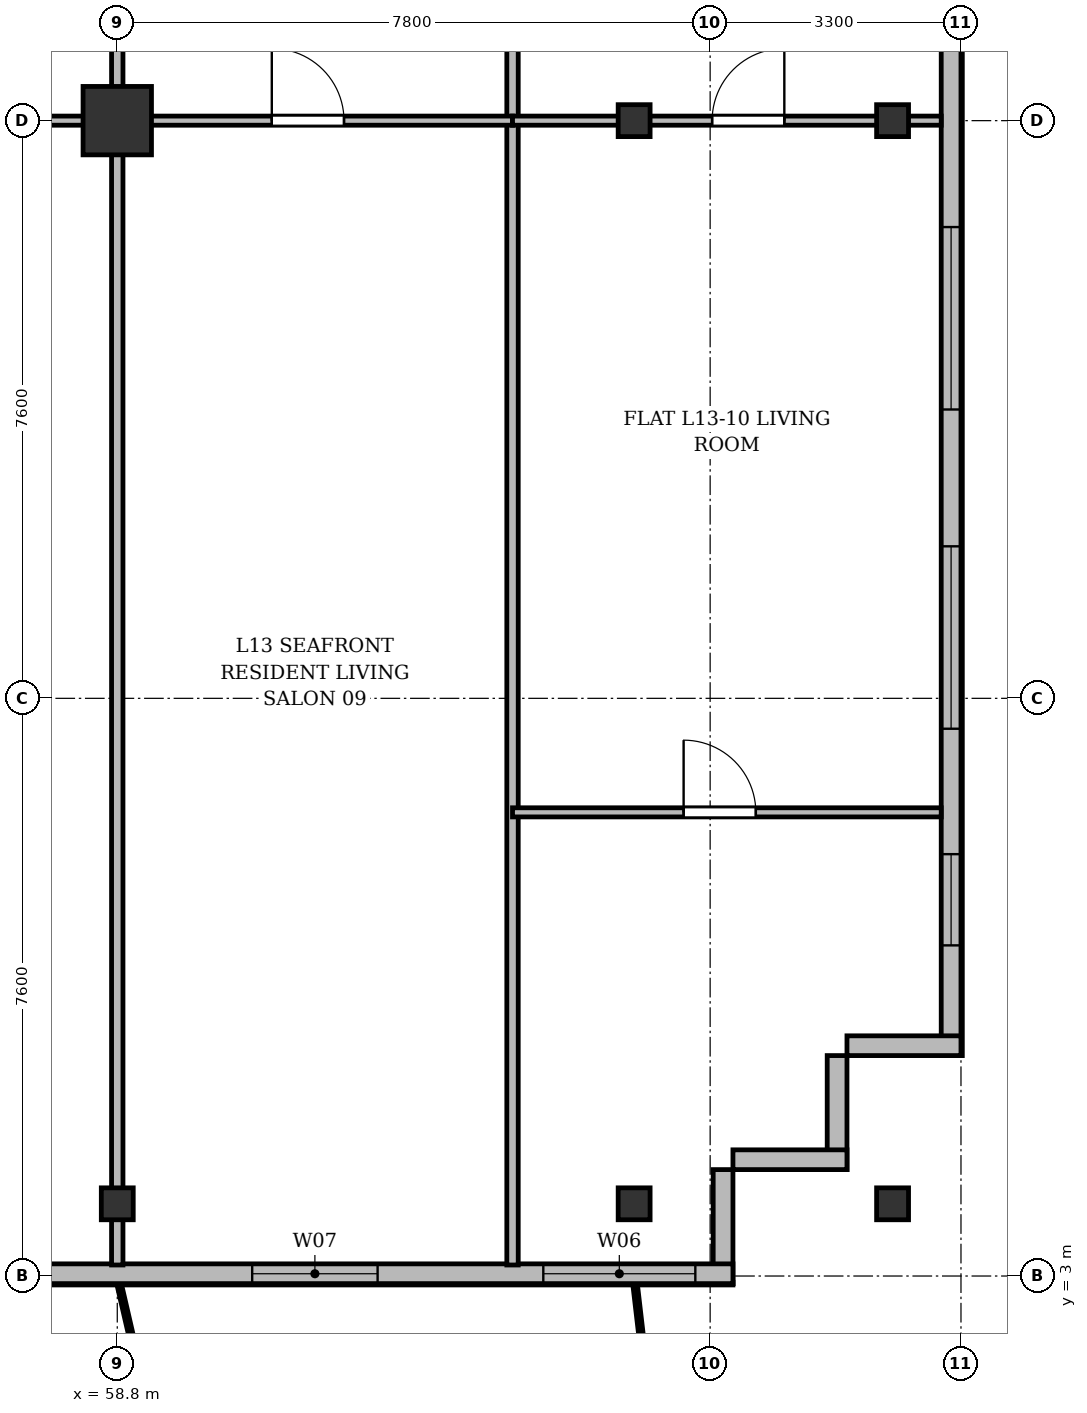
"""IFC4 building model, lengths in metres.
Left out: names, types, materials, properties, quantities, classifications, styles, units other than length and angle.
Written with IfcOpenShell. Run it as: python <this file> out.ifc"""

import sys

from ifc_helpers import new_model, si_unit, direction, frame, frame_2d, origin, origin_2d, place, context, subcontext, project, spatial, rectangle, i_section, extrude, source, transform, mapped, element, fill, save


model = new_model("IFC4")
c1 = context("Model", 3, precision=1e-05, world=origin(), true_north=direction((0.0, 1.0)))
c2 = subcontext(c1, "Body", "Model", "MODEL_VIEW")
j1 = project(units=[si_unit("LENGTHUNIT", "METRE"), si_unit("PLANEANGLEUNIT", "RADIAN")], contexts=[c1])
p1 = place(None, origin())
s1 = spatial("IfcSite", under=j1, at=p1, CompositionType="ELEMENT")
p2 = place(p1, origin())
s2 = spatial("IfcBuilding", under=s1, at=p2, CompositionType="ELEMENT")
p3 = place(p2, frame((0.0, 0.0, 52.3)))
s3 = spatial("IfcBuildingStorey", under=s2, at=p3, CompositionType="ELEMENT", Elevation=52.3)
m1 = source(origin(), c2, "Body", "SweptSolid", [
    extrude(i_section(OverallWidth=0.42, OverallDepth=0.42, WebThickness=0.026, FlangeThickness=0.04, at=origin_2d()), origin(), (0.0, 0.0, 1.0), 3.6),
])
p4 = place(p3, frame((58.8, 3.95, 0.0), z_axis=(0.0, 0.0, 1.0), x_axis=(1.0, 0.0, 0.0)))
e1 = element("IfcColumn", 1, at=p4, inside=s3, PredefinedType="COLUMN", context=c2, shape_type="MappedRepresentation", body=[
    mapped(m1, transform((0.0, 0.0, 0.0), x_axis=(1.0, 0.0, 0.0), y_axis=(0.0, 1.0, 0.0), z_axis=(0.0, 0.0, 1.0), scale=1.0)),
])
m2 = source(origin(), c2, "Body", "SweptSolid", [
    extrude(rectangle(XDim=0.9, YDim=0.9, at=origin_2d()), origin(), (0.0, 0.0, 1.0), 3.6),
])
p5 = place(p3, frame((58.8, 18.2, 0.0), z_axis=(0.0, 0.0, 1.0), x_axis=(1.0, 0.0, 0.0)))
e2 = element("IfcColumn", 2, at=p5, inside=s3, PredefinedType="COLUMN", context=c2, shape_type="MappedRepresentation", body=[
    mapped(m2, transform((0.0, 0.0, 0.0), x_axis=(1.0, 0.0, 0.0), y_axis=(0.0, 1.0, 0.0), z_axis=(0.0, 0.0, 1.0), scale=1.0)),
])
for number, where, z_axis, x_axis in (
    (3, (65.6, 3.95, 0.0), (0.0, 0.0, 1.0), (1.0, 0.0, 0.0)),
    (4, (65.6, 18.2, 0.0), (0.0, 0.0, 1.0), (1.0, 0.0, 0.0)),
    (5, (69.0, 3.95, 0.0), (0.0, 0.0, 1.0), (1.0, 0.0, 0.0)),
    (6, (69.0, 18.2, 0.0), (0.0, 0.0, 1.0), (1.0, 0.0, 0.0)),
):
    element("IfcColumn", number, at=place(p3, frame(where, z_axis=z_axis, x_axis=x_axis)), inside=s3, PredefinedType="COLUMN", context=c2, shape_type="MappedRepresentation", body=[
        mapped(m1, transform((0.0, 0.0, 0.0), x_axis=(1.0, 0.0, 0.0), y_axis=(0.0, 1.0, 0.0), z_axis=(0.0, 0.0, 1.0), scale=1.0)),
    ])
p6 = place(p3, frame((69.77, 45.5, 0.0), z_axis=(0.0, 0.0, 1.0), x_axis=(0.0, -1.0, 0.0)))
e7 = element("IfcWall", 7, at=p6, inside=s3, PredefinedType="SOLIDWALL", context=c2, shape_type="SweptSolid", body=[
    extrude(rectangle(XDim=39.6, YDim=0.26, at=frame_2d((19.8, 0.0))), origin(), (0.0, 0.0, 1.0), 3.34),
])
p7 = place(p6, frame((36.95, 0.0, 0.92)))
e8 = element("IfcOpeningElement", 8, at=p7, cuts=e7, PredefinedType="OPENING", context=c2, shape_type="SweptSolid", body=[
    extrude(rectangle(XDim=1.2, YDim=1.65, at=frame_2d((0.6, 0.825))), frame((0.0, 0.14, 0.0), z_axis=(0.0, -1.0, 0.0), x_axis=(1.0, 0.0, 0.0)), (0.0, 0.0, 1.0), 0.28),
])
p8 = place(p6, frame((32.9, 0.0, 0.92)))
e9 = element("IfcOpeningElement", 9, at=p8, cuts=e7, PredefinedType="OPENING", context=c2, shape_type="SweptSolid", body=[
    extrude(rectangle(XDim=2.4, YDim=2.1, at=frame_2d((1.2, 1.05))), frame((0.0, 0.14, 0.0), z_axis=(0.0, -1.0, 0.0), x_axis=(1.0, 0.0, 0.0)), (0.0, 0.0, 1.0), 0.28),
])
p9 = place(p6, frame((28.7, 0.0, 0.92)))
e10 = element("IfcOpeningElement", 10, at=p9, cuts=e7, PredefinedType="OPENING", context=c2, shape_type="SweptSolid", body=[
    extrude(rectangle(XDim=2.4, YDim=2.1, at=frame_2d((1.2, 1.05))), frame((0.0, 0.14, 0.0), z_axis=(0.0, -1.0, 0.0), x_axis=(1.0, 0.0, 0.0)), (0.0, 0.0, 1.0), 0.28),
])
p10 = place(p6, frame((21.5, 0.0, 0.92)))
e11 = element("IfcOpeningElement", 11, at=p10, cuts=e7, PredefinedType="OPENING", context=c2, shape_type="SweptSolid", body=[
    extrude(rectangle(XDim=2.4, YDim=2.1, at=frame_2d((1.2, 1.05))), frame((0.0, 0.14, 0.0), z_axis=(0.0, -1.0, 0.0), x_axis=(1.0, 0.0, 0.0)), (0.0, 0.0, 1.0), 0.28),
])
p11 = place(p6, frame((7.5, 0.0, 0.92)))
e12 = element("IfcOpeningElement", 12, at=p11, cuts=e7, PredefinedType="OPENING", context=c2, shape_type="SweptSolid", body=[
    extrude(rectangle(XDim=2.4, YDim=2.1, at=frame_2d((1.2, 1.05))), frame((0.0, 0.14, 0.0), z_axis=(0.0, -1.0, 0.0), x_axis=(1.0, 0.0, 0.0)), (0.0, 0.0, 1.0), 0.28),
])
p12 = place(p6, frame((4.5, 0.0, 0.92)))
e13 = element("IfcOpeningElement", 13, at=p12, cuts=e7, PredefinedType="OPENING", context=c2, shape_type="SweptSolid", body=[
    extrude(rectangle(XDim=1.2, YDim=1.65, at=frame_2d((0.6, 0.825))), frame((0.0, 0.14, 0.0), z_axis=(0.0, -1.0, 0.0), x_axis=(1.0, 0.0, 0.0)), (0.0, 0.0, 1.0), 0.28),
])
p13 = place(p6, frame((1.15, 0.0, 0.92)))
e14 = element("IfcOpeningElement", 14, at=p13, cuts=e7, PredefinedType="OPENING", context=c2, shape_type="SweptSolid", body=[
    extrude(rectangle(XDim=1.2, YDim=1.65, at=frame_2d((0.6, 0.825))), frame((0.0, 0.14, 0.0), z_axis=(0.0, -1.0, 0.0), x_axis=(1.0, 0.0, 0.0)), (0.0, 0.0, 1.0), 0.28),
])
p14 = place(p3, frame((69.9, 6.03, 0.0), z_axis=(0.0, 0.0, 1.0), x_axis=(-1.0, 0.0, 0.0)))
e15 = element("IfcWall", 15, at=p14, inside=s3, PredefinedType="SOLIDWALL", context=c2, shape_type="SweptSolid", body=[
    extrude(rectangle(XDim=1.5, YDim=0.26, at=frame_2d((0.75, 0.0))), origin(), (0.0, 0.0, 1.0), 2.752),
])
for number, where, z_axis, x_axis in (
    (16, (68.27, 5.9, 0.0), (0.0, 0.0, 1.0), (0.0, -1.0, 0.0)),
    (17, (68.4, 4.53, 0.0), (0.0, 0.0, 1.0), (-1.0, 0.0, 0.0)),
):
    element("IfcWall", number, at=place(p3, frame(where, z_axis=z_axis, x_axis=x_axis)), inside=s3, PredefinedType="SOLIDWALL", context=c2, shape_type="SweptSolid", body=[
        extrude(rectangle(XDim=1.5, YDim=0.26, at=frame_2d((0.75, 0.0))), origin(), (0.0, 0.0, 1.0), 3.34),
    ])
p15 = place(p3, frame((66.77, 4.4, 0.0), z_axis=(0.0, 0.0, 1.0), x_axis=(0.0, -1.0, 0.0)))
e18 = element("IfcWall", 18, at=p15, inside=s3, PredefinedType="SOLIDWALL", context=c2, shape_type="SweptSolid", body=[
    extrude(rectangle(XDim=1.5, YDim=0.26, at=frame_2d((0.75, 0.0))), origin(), (0.0, 0.0, 1.0), 2.69),
])
p16 = place(p3, frame((66.9, 3.03, 0.0), z_axis=(0.0, 0.0, 1.0), x_axis=(-1.0, 0.0, 0.0)))
e19 = element("IfcWall", 19, at=p16, inside=s3, PredefinedType="SOLIDWALL", context=c2, shape_type="SweptSolid", body=[
    extrude(rectangle(XDim=59.4, YDim=0.26, at=frame_2d((29.7, 0.0))), origin(), (0.0, 0.0, 1.0), 3.34),
])
p17 = place(p16, frame((0.495, 0.0, 0.9)))
e20 = element("IfcOpeningElement", 20, at=p17, cuts=e19, PredefinedType="OPENING", context=c2, shape_type="SweptSolid", body=[
    extrude(rectangle(XDim=2.0, YDim=1.95, at=frame_2d((1.0, 0.975))), frame((0.0, 0.14, 0.0), z_axis=(0.0, -1.0, 0.0), x_axis=(1.0, 0.0, 0.0)), (0.0, 0.0, 1.0), 0.28),
])
p18 = place(p16, frame((4.675, 0.0, 0.9)))
e21 = element("IfcOpeningElement", 21, at=p18, cuts=e19, PredefinedType="OPENING", context=c2, shape_type="SweptSolid", body=[
    extrude(rectangle(XDim=1.65, YDim=1.85, at=frame_2d((0.825, 0.925))), frame((0.0, 0.14, 0.0), z_axis=(0.0, -1.0, 0.0), x_axis=(1.0, 0.0, 0.0)), (0.0, 0.0, 1.0), 0.28),
])
p19 = place(p16, frame((11.1, 0.0, 0.9)))
e22 = element("IfcOpeningElement", 22, at=p19, cuts=e19, PredefinedType="OPENING", context=c2, shape_type="SweptSolid", body=[
    extrude(rectangle(XDim=1.8, YDim=1.8, at=frame_2d((0.9, 0.9))), frame((0.0, 0.14, 0.0), z_axis=(0.0, -1.0, 0.0), x_axis=(1.0, 0.0, 0.0)), (0.0, 0.0, 1.0), 0.28),
])
p20 = place(p16, frame((17.007, 0.0, 0.0)))
e23 = element("IfcOpeningElement", 23, at=p20, cuts=e19, PredefinedType="OPENING", context=c2, shape_type="SweptSolid", body=[
    extrude(rectangle(XDim=1.2, YDim=2.2, at=frame_2d((0.6, 1.1))), frame((0.0, 0.14, 0.0), z_axis=(0.0, -1.0, 0.0), x_axis=(1.0, 0.0, 0.0)), (0.0, 0.0, 1.0), 0.28),
])
p21 = place(p16, frame((20.55, 0.0, 0.9)))
e24 = element("IfcOpeningElement", 24, at=p21, cuts=e19, PredefinedType="OPENING", context=c2, shape_type="SweptSolid", body=[
    extrude(rectangle(XDim=1.5, YDim=1.75, at=frame_2d((0.75, 0.875))), frame((0.0, 0.14, 0.0), z_axis=(0.0, -1.0, 0.0), x_axis=(1.0, 0.0, 0.0)), (0.0, 0.0, 1.0), 0.28),
])
p22 = place(p16, frame((24.5, 0.0, 0.9)))
e25 = element("IfcOpeningElement", 25, at=p22, cuts=e19, PredefinedType="OPENING", context=c2, shape_type="SweptSolid", body=[
    extrude(rectangle(XDim=2.0, YDim=1.95, at=frame_2d((1.0, 0.975))), frame((0.0, 0.14, 0.0), z_axis=(0.0, -1.0, 0.0), x_axis=(1.0, 0.0, 0.0)), (0.0, 0.0, 1.0), 0.28),
])
p23 = place(p16, frame((31.275, 0.0, 0.9)))
e26 = element("IfcOpeningElement", 26, at=p23, cuts=e19, PredefinedType="OPENING", context=c2, shape_type="SweptSolid", body=[
    extrude(rectangle(XDim=1.65, YDim=1.85, at=frame_2d((0.825, 0.925))), frame((0.0, 0.14, 0.0), z_axis=(0.0, -1.0, 0.0), x_axis=(1.0, 0.0, 0.0)), (0.0, 0.0, 1.0), 0.28),
])
p24 = place(p16, frame((39.0, 0.0, 0.9)))
e27 = element("IfcOpeningElement", 27, at=p24, cuts=e19, PredefinedType="OPENING", context=c2, shape_type="SweptSolid", body=[
    extrude(rectangle(XDim=1.8, YDim=1.8, at=frame_2d((0.9, 0.9))), frame((0.0, 0.14, 0.0), z_axis=(0.0, -1.0, 0.0), x_axis=(1.0, 0.0, 0.0)), (0.0, 0.0, 1.0), 0.28),
])
p25 = place(p16, frame((45.435, 0.0, 0.0)))
e28 = element("IfcOpeningElement", 28, at=p25, cuts=e19, PredefinedType="OPENING", context=c2, shape_type="SweptSolid", body=[
    extrude(rectangle(XDim=1.2, YDim=2.2, at=frame_2d((0.6, 1.1))), frame((0.0, 0.14, 0.0), z_axis=(0.0, -1.0, 0.0), x_axis=(1.0, 0.0, 0.0)), (0.0, 0.0, 1.0), 0.28),
])
p26 = place(p16, frame((48.6, 0.0, 0.9)))
e29 = element("IfcOpeningElement", 29, at=p26, cuts=e19, PredefinedType="OPENING", context=c2, shape_type="SweptSolid", body=[
    extrude(rectangle(XDim=1.5, YDim=1.75, at=frame_2d((0.75, 0.875))), frame((0.0, 0.14, 0.0), z_axis=(0.0, -1.0, 0.0), x_axis=(1.0, 0.0, 0.0)), (0.0, 0.0, 1.0), 0.28),
])
p27 = place(p16, frame((52.1, 0.0, 0.9)))
e30 = element("IfcOpeningElement", 30, at=p27, cuts=e19, PredefinedType="OPENING", context=c2, shape_type="SweptSolid", body=[
    extrude(rectangle(XDim=2.0, YDim=1.95, at=frame_2d((1.0, 0.975))), frame((0.0, 0.14, 0.0), z_axis=(0.0, -1.0, 0.0), x_axis=(1.0, 0.0, 0.0)), (0.0, 0.0, 1.0), 0.28),
])
p28 = place(p16, frame((56.28, 0.0, 0.9)))
e31 = element("IfcOpeningElement", 31, at=p28, cuts=e19, PredefinedType="OPENING", context=c2, shape_type="SweptSolid", body=[
    extrude(rectangle(XDim=1.65, YDim=1.85, at=frame_2d((0.825, 0.925))), frame((0.0, 0.14, 0.0), z_axis=(0.0, -1.0, 0.0), x_axis=(1.0, 0.0, 0.0)), (0.0, 0.0, 1.0), 0.28),
])
p29 = place(p3, frame((58.8, 3.145, 0.0), z_axis=(0.0, 0.0, 1.0), x_axis=(0.0, 1.0, 0.0)))
e32 = element("IfcWall", 32, at=p29, inside=s3, PredefinedType="PARTITIONING", context=c2, shape_type="SweptSolid", body=[
    extrude(rectangle(XDim=24.455, YDim=0.15, at=frame_2d((12.228, 0.0))), origin(), (0.0, 0.0, 1.0), 2.752),
])
p30 = place(p3, frame((64.0, 3.145, 0.0), z_axis=(0.0, 0.0, 1.0), x_axis=(0.0, 1.0, 0.0)))
e33 = element("IfcWall", 33, at=p30, inside=s3, PredefinedType="PARTITIONING", context=c2, shape_type="SweptSolid", body=[
    extrude(rectangle(XDim=24.455, YDim=0.15, at=frame_2d((12.228, 0.0))), origin(), (0.0, 0.0, 1.0), 2.69),
])
p31 = place(p3, frame((51.0, 18.2, 0.0), z_axis=(0.0, 0.0, 1.0), x_axis=(1.0, 0.0, 0.0)))
e34 = element("IfcWall", 34, at=p31, inside=s3, PredefinedType="PARTITIONING", context=c2, shape_type="SweptSolid", body=[
    extrude(rectangle(XDim=7.8, YDim=0.12, at=frame_2d((3.9, 0.0))), origin(), (0.0, 0.0, 1.0), 2.69),
])
p32 = place(p31, frame((3.333, 0.0, 0.0)))
e35 = element("IfcOpeningElement", 35, at=p32, cuts=e34, PredefinedType="OPENING", context=c2, shape_type="SweptSolid", body=[
    extrude(rectangle(XDim=0.95, YDim=2.15, at=frame_2d((0.475, 1.075))), frame((0.0, 0.07, 0.0), z_axis=(0.0, -1.0, 0.0), x_axis=(1.0, 0.0, 0.0)), (0.0, 0.0, 1.0), 0.14),
])
p33 = place(p3, frame((58.8, 18.2, 0.0), z_axis=(0.0, 0.0, 1.0), x_axis=(1.0, 0.0, 0.0)))
e36 = element("IfcWall", 36, at=p33, inside=s3, PredefinedType="PARTITIONING", context=c2, shape_type="SweptSolid", body=[
    extrude(rectangle(XDim=5.2, YDim=0.12, at=frame_2d((2.6, 0.0))), origin(), (0.0, 0.0, 1.0), 2.69),
])
p34 = place(p33, frame((2.033, 0.0, 0.0)))
e37 = element("IfcOpeningElement", 37, at=p34, cuts=e36, PredefinedType="OPENING", context=c2, shape_type="SweptSolid", body=[
    extrude(rectangle(XDim=0.95, YDim=2.15, at=frame_2d((0.475, 1.075))), frame((0.0, 0.07, 0.0), z_axis=(0.0, -1.0, 0.0), x_axis=(1.0, 0.0, 0.0)), (0.0, 0.0, 1.0), 0.14),
])
p35 = place(p3, frame((64.0, 18.2, 0.0), z_axis=(0.0, 0.0, 1.0), x_axis=(1.0, 0.0, 0.0)))
e38 = element("IfcWall", 38, at=p35, inside=s3, PredefinedType="PARTITIONING", context=c2, shape_type="SweptSolid", body=[
    extrude(rectangle(XDim=5.64, YDim=0.12, at=frame_2d((2.82, 0.0))), origin(), (0.0, 0.0, 1.0), 2.69),
])
p36 = place(p35, frame((2.626, 0.0, 0.0)))
e39 = element("IfcOpeningElement", 39, at=p36, cuts=e38, PredefinedType="OPENING", context=c2, shape_type="SweptSolid", body=[
    extrude(rectangle(XDim=0.95, YDim=2.15, at=frame_2d((0.475, 1.075))), frame((0.0, 0.07, 0.0), z_axis=(0.0, -1.0, 0.0), x_axis=(1.0, 0.0, 0.0)), (0.0, 0.0, 1.0), 0.14),
])
p37 = place(p3, frame((64.0, 9.1, 0.0), z_axis=(0.0, 0.0, 1.0), x_axis=(1.0, 0.0, 0.0)))
e40 = element("IfcWall", 40, at=p37, inside=s3, PredefinedType="PARTITIONING", context=c2, shape_type="SweptSolid", body=[
    extrude(rectangle(XDim=5.64, YDim=0.12, at=frame_2d((2.82, 0.0))), origin(), (0.0, 0.0, 1.0), 2.752),
])
p38 = place(p37, frame((2.251, 0.0, 0.0)))
e41 = element("IfcOpeningElement", 41, at=p38, cuts=e40, PredefinedType="OPENING", context=c2, shape_type="SweptSolid", body=[
    extrude(rectangle(XDim=0.95, YDim=2.15, at=frame_2d((0.475, 1.075))), frame((0.0, 0.07, 0.0), z_axis=(0.0, -1.0, 0.0), x_axis=(1.0, 0.0, 0.0)), (0.0, 0.0, 1.0), 0.14),
])
m3 = source(origin(), c2, "Body", "SweptSolid", [
    extrude(rectangle(XDim=1.2, YDim=1.65, at=frame_2d((0.6, 0.825))), frame((0.0, 0.03, 0.0), z_axis=(0.0, -1.0, 0.0), x_axis=(1.0, 0.0, 0.0)), (0.0, 0.0, 1.0), 0.06),
])
p39 = place(p7, origin())
e42 = element("IfcWindow", 42, at=p39, inside=s3, PartitioningType="SINGLE_PANEL", PredefinedType="WINDOW", context=c2, shape_type="MappedRepresentation", body=[
    mapped(m3, transform((0.0, 0.0, 0.0), x_axis=(1.0, 0.0, 0.0), y_axis=(0.0, 1.0, 0.0), z_axis=(0.0, 0.0, 1.0), scale=1.0)),
])
fill(e8, e42)
m4 = source(origin(), c2, "Body", "SweptSolid", [
    extrude(rectangle(XDim=2.4, YDim=2.1, at=frame_2d((1.2, 1.05))), frame((0.0, 0.03, 0.0), z_axis=(0.0, -1.0, 0.0), x_axis=(1.0, 0.0, 0.0)), (0.0, 0.0, 1.0), 0.06),
])
p40 = place(p8, origin())
e43 = element("IfcWindow", 43, at=p40, inside=s3, PartitioningType="SINGLE_PANEL", PredefinedType="WINDOW", context=c2, shape_type="MappedRepresentation", body=[
    mapped(m4, transform((0.0, 0.0, 0.0), x_axis=(1.0, 0.0, 0.0), y_axis=(0.0, 1.0, 0.0), z_axis=(0.0, 0.0, 1.0), scale=1.0)),
])
fill(e9, e43)
p41 = place(p9, origin())
e44 = element("IfcWindow", 44, at=p41, inside=s3, PartitioningType="SINGLE_PANEL", PredefinedType="WINDOW", context=c2, shape_type="MappedRepresentation", body=[
    mapped(m4, transform((0.0, 0.0, 0.0), x_axis=(1.0, 0.0, 0.0), y_axis=(0.0, 1.0, 0.0), z_axis=(0.0, 0.0, 1.0), scale=1.0)),
])
fill(e10, e44)
m5 = source(origin(), c2, "Body", "SweptSolid", [
    extrude(rectangle(XDim=2.0, YDim=1.95, at=frame_2d((1.0, 0.975))), frame((0.0, 0.03, 0.0), z_axis=(0.0, -1.0, 0.0), x_axis=(1.0, 0.0, 0.0)), (0.0, 0.0, 1.0), 0.06),
])
p42 = place(p17, origin())
e45 = element("IfcWindow", 45, at=p42, inside=s3, PartitioningType="SINGLE_PANEL", PredefinedType="WINDOW", context=c2, shape_type="MappedRepresentation", body=[
    mapped(m5, transform((0.0, 0.0, 0.0), x_axis=(1.0, 0.0, 0.0), y_axis=(0.0, 1.0, 0.0), z_axis=(0.0, 0.0, 1.0), scale=1.0)),
])
fill(e20, e45)
m6 = source(origin(), c2, "Body", "SweptSolid", [
    extrude(rectangle(XDim=1.65, YDim=1.85, at=frame_2d((0.825, 0.925))), frame((0.0, 0.03, 0.0), z_axis=(0.0, -1.0, 0.0), x_axis=(1.0, 0.0, 0.0)), (0.0, 0.0, 1.0), 0.06),
])
p43 = place(p18, origin())
e46 = element("IfcWindow", 46, at=p43, inside=s3, PartitioningType="SINGLE_PANEL", PredefinedType="WINDOW", context=c2, shape_type="MappedRepresentation", body=[
    mapped(m6, transform((0.0, 0.0, 0.0), x_axis=(1.0, 0.0, 0.0), y_axis=(0.0, 1.0, 0.0), z_axis=(0.0, 0.0, 1.0), scale=1.0)),
])
fill(e21, e46)
m7 = source(origin(), c2, "Body", "SweptSolid", [
    extrude(rectangle(XDim=0.95, YDim=2.15, at=frame_2d((0.475, 1.075))), frame((0.0, 0.025, 0.0), z_axis=(0.0, -1.0, 0.0), x_axis=(1.0, 0.0, 0.0)), (0.0, 0.0, 1.0), 0.05),
])
p44 = place(p34, origin())
e47 = element("IfcDoor", 47, at=p44, inside=s3, OperationType="SINGLE_SWING_LEFT", PredefinedType="DOOR", context=c2, shape_type="MappedRepresentation", body=[
    mapped(m7, transform((0.0, 0.0, 0.0), x_axis=(1.0, 0.0, 0.0), y_axis=(0.0, 1.0, 0.0), z_axis=(0.0, 0.0, 1.0), scale=1.0)),
])
fill(e37, e47)
p45 = place(p36, origin())
e48 = element("IfcDoor", 48, at=p45, inside=s3, OperationType="SINGLE_SWING_RIGHT", PredefinedType="DOOR", context=c2, shape_type="MappedRepresentation", body=[
    mapped(m7, transform((0.0, 0.0, 0.0), x_axis=(1.0, 0.0, 0.0), y_axis=(0.0, 1.0, 0.0), z_axis=(0.0, 0.0, 1.0), scale=1.0)),
])
fill(e39, e48)
p46 = place(p38, origin())
e49 = element("IfcDoor", 49, at=p46, inside=s3, OperationType="SINGLE_SWING_LEFT", PredefinedType="DOOR", context=c2, shape_type="MappedRepresentation", body=[
    mapped(m7, transform((0.0, 0.0, 0.0), x_axis=(1.0, 0.0, 0.0), y_axis=(0.0, 1.0, 0.0), z_axis=(0.0, 0.0, 1.0), scale=1.0)),
])
fill(e41, e49)
save(model, sys.argv[1])
